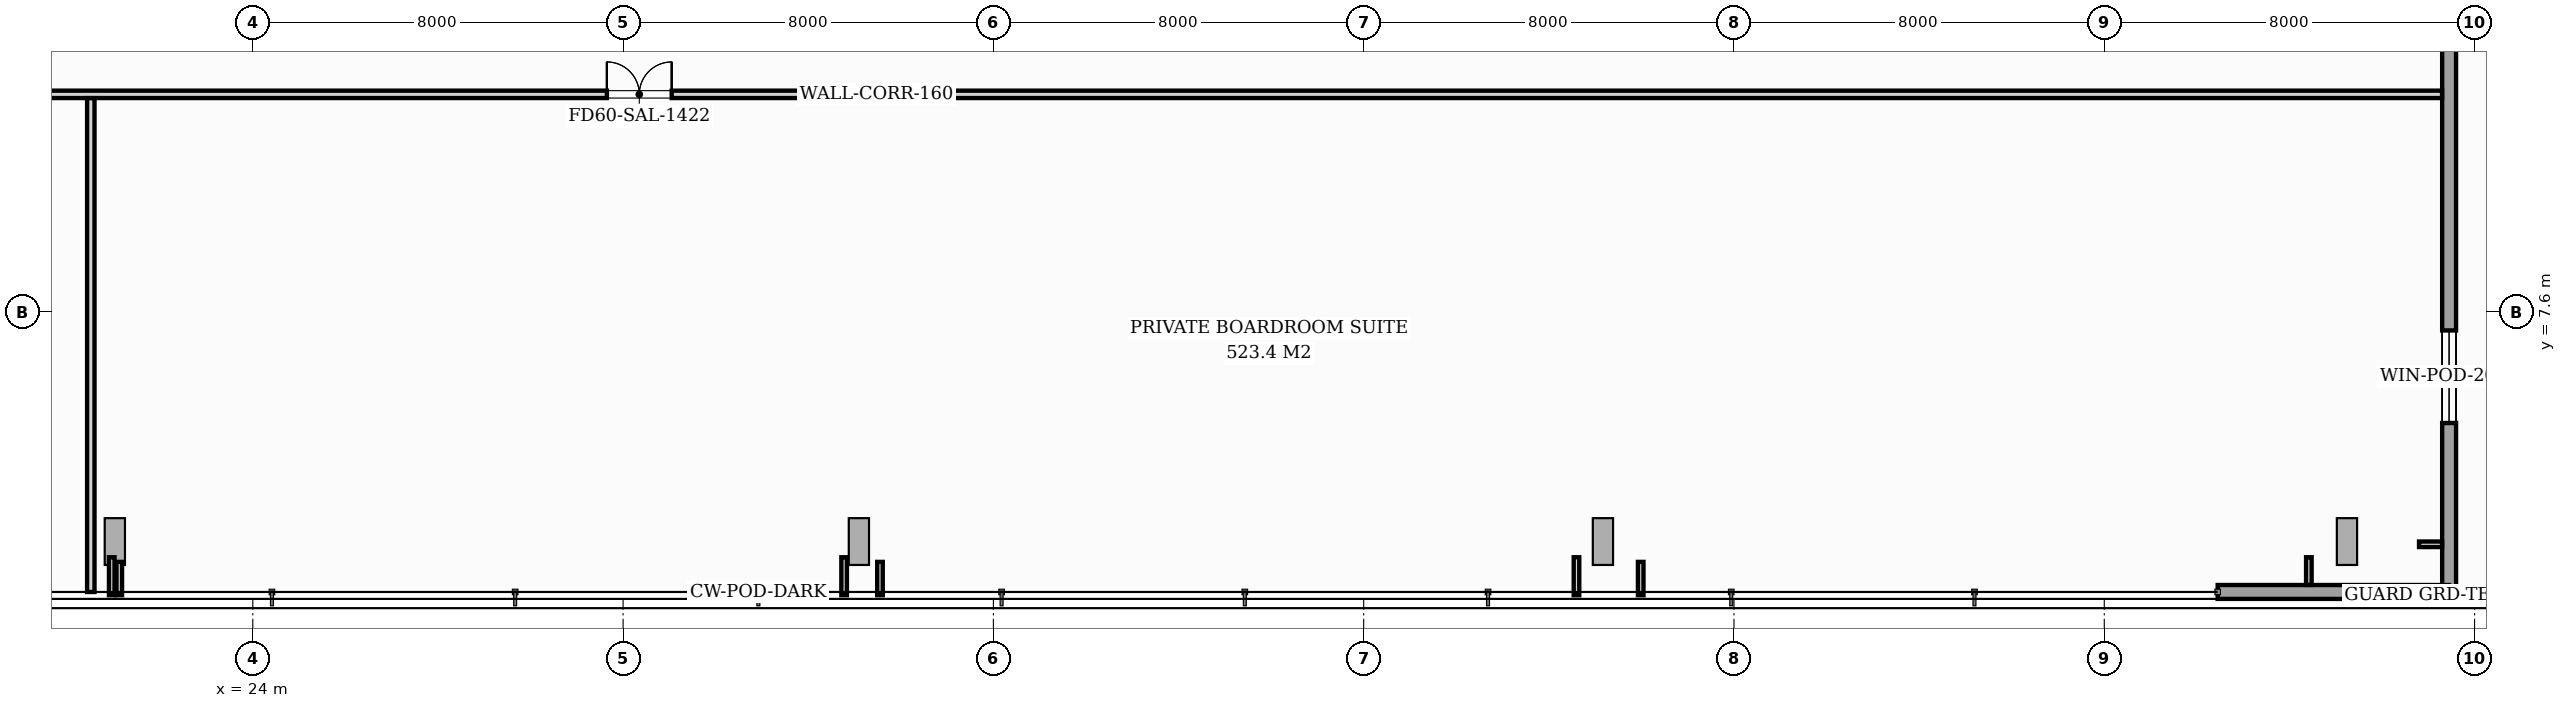
"""IFC4 building model, lengths in metres.
Left out: names, types, materials, properties, quantities, classifications, styles, units other than length and angle.
Written with IfcOpenShell. Run it as: python <this file> out.ifc"""

import sys

from ifc_helpers import new_model, si_unit, direction, frame, frame_2d, origin, origin_2d, place, context, subcontext, project, spatial, rectangle, i_section, extrude, source, transform, mapped, element, fill, save


model = new_model("IFC4")
c1 = context("Model", 3, precision=1e-05, world=origin(), true_north=direction((0.0, 1.0)))
c2 = subcontext(c1, "Body", "Model", "MODEL_VIEW")
j1 = project(units=[si_unit("LENGTHUNIT", "METRE"), si_unit("PLANEANGLEUNIT", "RADIAN")], contexts=[c1])
p1 = place(None, origin())
s1 = spatial("IfcSite", under=j1, at=p1, CompositionType="ELEMENT")
p2 = place(p1, origin())
s2 = spatial("IfcBuilding", under=s1, at=p2, CompositionType="ELEMENT")
p3 = place(p2, frame((0.0, 0.0, 14.0)))
s3 = spatial("IfcBuildingStorey", under=s2, at=p3, CompositionType="ELEMENT", Elevation=14.0)
m1 = source(origin(), c2, "Body", "SweptSolid", [
    extrude(i_section(OverallWidth=0.438, OverallDepth=1.011, WebThickness=0.041, FlangeThickness=0.074, FilletRadius=0.024, at=origin_2d()), origin(), (0.0, 0.0, 1.0), 4.033),
])
p4 = place(p3, frame((21.112, 2.582, 0.032), z_axis=(-0.079308537236, 0.048795939704, 0.995655117091), x_axis=(0.848002409815, -0.521748047565, 0.093117602043)))
e1 = element("IfcColumn", 1, at=p4, inside=s3, PredefinedType="COLUMN", context=c2, shape_type="MappedRepresentation", body=[
    mapped(m1, transform((0.0, 0.0, 0.0), scale=1.0)),
])
m2 = source(origin(), c2, "Body", "SweptSolid", [
    extrude(i_section(OverallWidth=0.438, OverallDepth=1.011, WebThickness=0.041, FlangeThickness=0.074, FilletRadius=0.024, at=origin_2d()), origin(), (0.0, 0.0, 1.0), 4.176),
])
p5 = place(p3, frame((37.516, 2.584, 0.09), z_axis=(-0.354756489116, 0.045776916773, 0.933837409467), x_axis=(0.92615864884, -0.119509265333, 0.357697767227)))
e2 = element("IfcColumn", 2, at=p5, inside=s3, PredefinedType="COLUMN", context=c2, shape_type="MappedRepresentation", body=[
    mapped(m2, transform((0.0, 0.0, 0.0), scale=1.0)),
])
m3 = source(origin(), c2, "Body", "SweptSolid", [
    extrude(i_section(OverallWidth=0.438, OverallDepth=1.011, WebThickness=0.041, FlangeThickness=0.074, FilletRadius=0.024, at=origin_2d()), origin(), (0.0, 0.0, 1.0), 4.611),
])
p6 = place(p3, frame((53.893, 2.587, 0.135), z_axis=(-0.561931105076, 0.040504786148, 0.826191742543), x_axis=(0.824053735874, -0.059398954861, 0.563389034818)))
e3 = element("IfcColumn", 3, at=p6, inside=s3, PredefinedType="COLUMN", context=c2, shape_type="MappedRepresentation", body=[
    mapped(m3, transform((0.0, 0.0, 0.0), scale=1.0)),
])
m4 = source(origin(), c2, "Body", "SweptSolid", [
    extrude(i_section(OverallWidth=0.438, OverallDepth=1.011, WebThickness=0.041, FlangeThickness=0.074, FilletRadius=0.024, at=origin_2d()), origin(), (0.0, 0.0, 1.0), 5.254),
])
p7 = place(p3, frame((70.258, 2.588, 0.165), z_axis=(-0.69964600083, 0.034989270016, 0.713632415538), x_axis=(0.712741689946, -0.035644184933, 0.700520360513)))
e4 = element("IfcColumn", 4, at=p7, inside=s3, PredefinedType="COLUMN", context=c2, shape_type="MappedRepresentation", body=[
    mapped(m4, transform((0.0, 0.0, 0.0), scale=1.0)),
])
p8 = place(p3, frame((71.45, 32.85, 0.0), z_axis=(0.0, 0.0, 1.0), x_axis=(0.0, -1.0, 0.0)))
e5 = element("IfcWall", 5, at=p8, inside=s3, PredefinedType="STANDARD", context=c2, shape_type="SweptSolid", body=[
    extrude(rectangle(XDim=31.3, YDim=0.3, at=frame_2d((15.65, 0.0))), origin(), (0.0, 0.0, 1.0), 4.08),
])
p9 = place(p8, frame((7.85, 0.0, 0.0)))
e6 = element("IfcOpeningElement", 6, at=p9, cuts=e5, PredefinedType="OPENING", context=c2, shape_type="SweptSolid", body=[
    extrude(rectangle(XDim=1.6, YDim=2.1, at=frame_2d((0.8, 1.05))), frame((0.0, 0.16, 0.0), z_axis=(0.0, -1.0, 0.0), x_axis=(1.0, 0.0, 0.0)), (0.0, 0.0, 1.0), 0.32),
])
p10 = place(p8, frame((25.65, 0.0, 0.9)))
e7 = element("IfcOpeningElement", 7, at=p10, cuts=e5, PredefinedType="OPENING", context=c2, shape_type="SweptSolid", body=[
    extrude(rectangle(XDim=2.0, YDim=2.4, at=frame_2d((1.0, 1.2))), frame((0.0, 0.16, 0.0), z_axis=(0.0, -1.0, 0.0), x_axis=(1.0, 0.0, 0.0)), (0.0, 0.0, 1.0), 0.32),
])
p11 = place(p3, frame((71.45, 1.55, 0.0), z_axis=(0.0, 0.0, 1.0), x_axis=(-1.0, 0.0, 0.0)))
e8 = element("IfcWall", 8, at=p11, inside=s3, PredefinedType="STANDARD", context=c2, shape_type="SweptSolid", body=[
    extrude(rectangle(XDim=5.0, YDim=0.3, at=frame_2d((2.5, 0.0))), origin(), (0.0, 0.0, 1.0), 4.08),
])
p12 = place(p3, frame((3.65, 12.3, 0.0), z_axis=(0.0, 0.0, 1.0), x_axis=(1.0, 0.0, 0.0)))
e9 = element("IfcWall", 9, at=p12, inside=s3, PredefinedType="PARTITIONING", context=c2, shape_type="SweptSolid", body=[
    extrude(rectangle(XDim=67.648, YDim=0.16, at=frame_2d((33.824, 0.0))), origin(), (0.0, 0.0, 1.0), 4.08),
])
p13 = place(p12, frame((6.5, 0.0, 0.0)))
e10 = element("IfcOpeningElement", 10, at=p13, cuts=e9, PredefinedType="OPENING", context=c2, shape_type="SweptSolid", body=[
    extrude(rectangle(XDim=1.4, YDim=2.08, at=frame_2d((0.7, 1.04))), frame((0.0, 0.09, 0.0), z_axis=(0.0, -1.0, 0.0), x_axis=(1.0, 0.0, 0.0)), (0.0, 0.0, 1.0), 0.18),
])
p14 = place(p12, frame((28.0, 0.0, 0.0)))
e11 = element("IfcOpeningElement", 11, at=p14, cuts=e9, PredefinedType="OPENING", context=c2, shape_type="SweptSolid", body=[
    extrude(rectangle(XDim=1.4, YDim=2.08, at=frame_2d((0.7, 1.04))), frame((0.0, 0.09, 0.0), z_axis=(0.0, -1.0, 0.0), x_axis=(1.0, 0.0, 0.0)), (0.0, 0.0, 1.0), 0.18),
])
p15 = place(p3, frame((20.5, 1.55, 0.0), z_axis=(0.0, 0.0, 1.0), x_axis=(0.0, 1.0, 0.0)))
e12 = element("IfcWall", 12, at=p15, inside=s3, PredefinedType="PARTITIONING", context=c2, shape_type="SweptSolid", body=[
    extrude(rectangle(XDim=10.668, YDim=0.16, at=frame_2d((5.334, 0.0))), origin(), (0.0, 0.0, 1.0), 3.185),
])
for number, where, z_axis, x_axis in (
    (13, (20.952, 2.3, 0.0), (0.0, 0.0, 1.0), (0.0, -1.0, 0.0)),
    (14, (36.775, 2.3, 0.0), (0.0, 0.0, 1.0), (0.0, -1.0, 0.0)),
    (15, (52.597, 2.3, 0.0), (0.0, 0.0, 1.0), (0.0, -1.0, 0.0)),
):
    element("IfcWall", number, at=place(p3, frame(where, z_axis=z_axis, x_axis=x_axis)), inside=s3, PredefinedType="PARTITIONING", context=c2, shape_type="SweptSolid", body=[
        extrude(rectangle(XDim=0.82, YDim=0.12, at=frame_2d((0.41, 0.0))), origin(), (0.0, 0.0, 1.0), 4.08),
    ])
p16 = place(p3, frame((68.42, 2.3, 0.0), z_axis=(0.0, 0.0, 1.0), x_axis=(0.0, -1.0, 0.0)))
e16 = element("IfcWall", 16, at=p16, inside=s3, PredefinedType="PARTITIONING", context=c2, shape_type="SweptSolid", body=[
    extrude(rectangle(XDim=0.598, YDim=0.12, at=frame_2d((0.299, 0.0))), origin(), (0.0, 0.0, 1.0), 4.08),
])
for number, where, z_axis, x_axis in (
    (17, (21.115, 2.2, 0.0), (0.0, 0.0, 1.0), (0.0, -1.0, 0.0)),
    (18, (37.55, 2.2, 0.0), (0.0, 0.0, 1.0), (0.0, -1.0, 0.0)),
    (19, (53.985, 2.2, 0.0), (0.0, 0.0, 1.0), (0.0, -1.0, 0.0)),
):
    element("IfcWall", number, at=place(p3, frame(where, z_axis=z_axis, x_axis=x_axis)), inside=s3, PredefinedType="PARTITIONING", context=c2, shape_type="SweptSolid", body=[
        extrude(rectangle(XDim=0.72, YDim=0.12, at=frame_2d((0.36, 0.0))), origin(), (0.0, 0.0, 1.0), 4.08),
    ])
p17 = place(p3, frame((70.8, 2.58, 0.0), z_axis=(0.0, 0.0, 1.0), x_axis=(1.0, 0.0, 0.0)))
e20 = element("IfcWall", 20, at=p17, inside=s3, PredefinedType="PARTITIONING", context=c2, shape_type="SweptSolid", body=[
    extrude(rectangle(XDim=0.498, YDim=0.12, at=frame_2d((0.249, 0.0))), origin(), (0.0, 0.0, 1.0), 4.08),
])
m5 = source(origin(), c2, "Body", "SweptSolid", [
    extrude(rectangle(XDim=2.0, YDim=2.4, at=frame_2d((1.0, 1.2))), frame((0.0, 0.03, 0.0), z_axis=(0.0, -1.0, 0.0), x_axis=(1.0, 0.0, 0.0)), (0.0, 0.0, 1.0), 0.06),
])
p18 = place(p10, origin())
e21 = element("IfcWindow", 21, at=p18, inside=s3, PartitioningType="SINGLE_PANEL", PredefinedType="WINDOW", context=c2, shape_type="MappedRepresentation", body=[
    mapped(m5, transform((0.0, 0.0, 0.0), scale=1.0)),
])
fill(e7, e21)
m6 = source(origin(), c2, "Body", "SweptSolid", [
    extrude(rectangle(XDim=1.4, YDim=2.08, at=frame_2d((0.7, 1.04))), frame((0.0, 0.025, 0.0), z_axis=(0.0, -1.0, 0.0), x_axis=(1.0, 0.0, 0.0)), (0.0, 0.0, 1.0), 0.05),
])
p19 = place(p14, origin())
e22 = element("IfcDoor", 22, at=p19, inside=s3, OperationType="DOUBLE_DOOR_SINGLE_SWING", PredefinedType="DOOR", context=c2, shape_type="MappedRepresentation", body=[
    mapped(m6, transform((0.0, 0.0, 0.0), scale=1.0)),
])
fill(e11, e22)
save(model, sys.argv[1])
